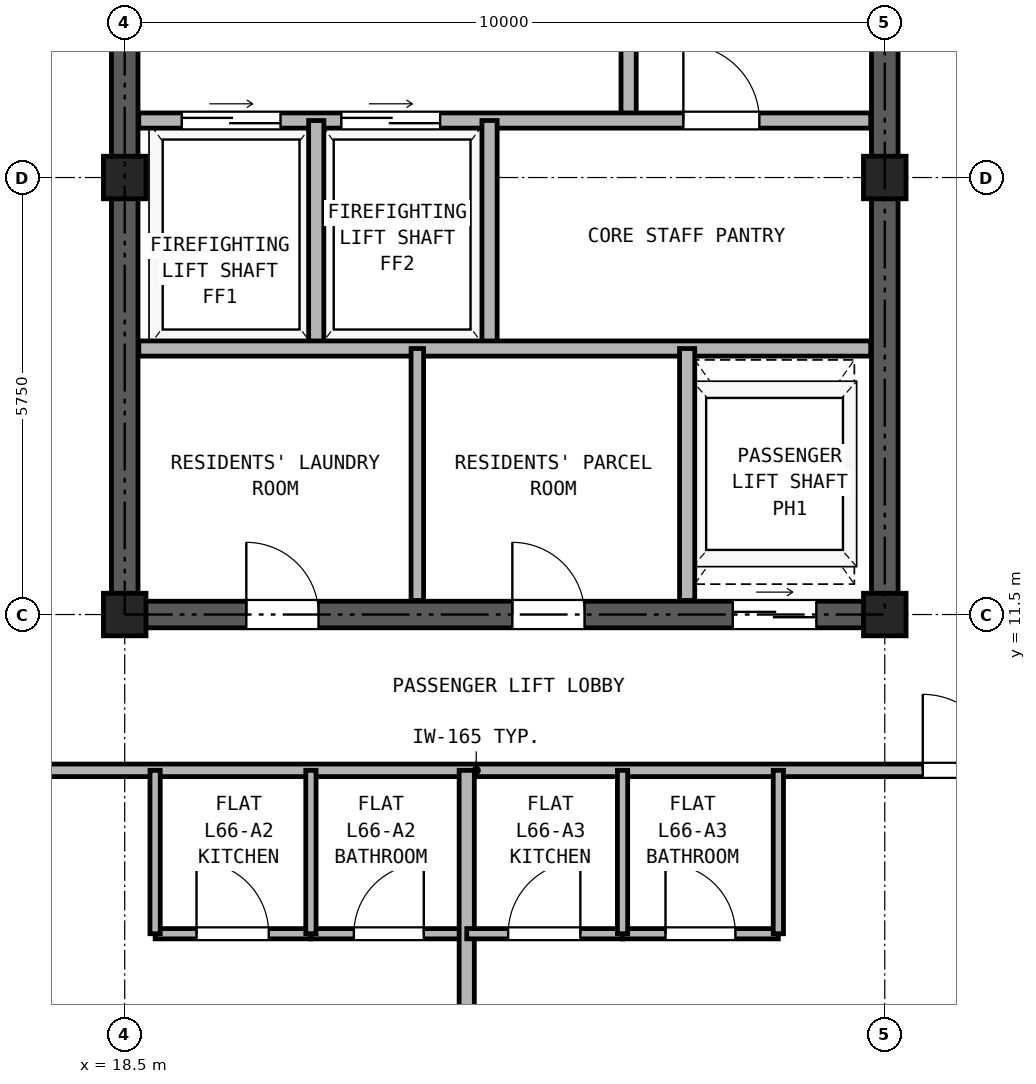
"""IFC4 building model, lengths in metres.
Left out: names, types, materials, properties, quantities, classifications, styles, units other than length and angle.
Written with IfcOpenShell. Run it as: python <this file> out.ifc"""

import sys

from ifc_helpers import new_model, si_unit, direction, frame, frame_2d, origin, origin_2d, place, context, subcontext, project, spatial, rectangle, hollow_rectangle, extrude, source, transform, mapped, element, fill, save


model = new_model("IFC4")
c1 = context("Model", 3, precision=1e-05, world=origin(), true_north=direction((0.0, 1.0)))
c2 = subcontext(c1, "Body", "Model", "MODEL_VIEW")
j1 = project(units=[si_unit("LENGTHUNIT", "METRE"), si_unit("PLANEANGLEUNIT", "RADIAN")], contexts=[c1])
p1 = place(None, origin())
s1 = spatial("IfcSite", under=j1, at=p1, CompositionType="ELEMENT")
p2 = place(p1, origin())
s2 = spatial("IfcBuilding", under=s1, at=p2, CompositionType="ELEMENT")
p3 = place(p2, frame((0.0, 0.0, 232.9)))
s3 = spatial("IfcBuildingStorey", under=s2, at=p3, CompositionType="ELEMENT", Elevation=232.9)
m1 = source(origin(), c2, "Body", "SweptSolid", [
    extrude(hollow_rectangle(XDim=0.56, YDim=0.56, WallThickness=0.03, at=origin_2d()), origin(), (0.0, 0.0, 1.0), 2.98),
])
for number, where, z_axis, x_axis in (
    (1, (18.5, 11.5, 0.0), (0.0, 0.0, 1.0), (1.0, 0.0, 0.0)),
    (2, (18.5, 17.25, 0.0), (0.0, 0.0, 1.0), (1.0, 0.0, 0.0)),
    (3, (28.5, 11.5, 0.0), (0.0, 0.0, 1.0), (1.0, 0.0, 0.0)),
    (4, (28.5, 17.25, 0.0), (0.0, 0.0, 1.0), (1.0, 0.0, 0.0)),
):
    element("IfcColumn", number, at=place(p3, frame(where, z_axis=z_axis, x_axis=x_axis)), inside=s3, PredefinedType="COLUMN", context=c2, shape_type="MappedRepresentation", body=[
        mapped(m1, transform((0.0, 0.0, 0.0), x_axis=(1.0, 0.0, 0.0), y_axis=(0.0, 1.0, 0.0), z_axis=(0.0, 0.0, 1.0), scale=1.0)),
    ])
p4 = place(p3, frame((18.325, 11.5, 0.0), z_axis=(0.0, 0.0, 1.0), x_axis=(1.0, 0.0, 0.0)))
e5 = element("IfcWall", 5, at=p4, inside=s3, PredefinedType="SHEAR", context=c2, shape_type="SweptSolid", body=[
    extrude(rectangle(XDim=10.35, YDim=0.35, at=frame_2d((5.175, 0.0))), origin(), (0.0, 0.0, 1.0), 2.98),
])
p5 = place(p4, frame((1.775, 0.0, 0.0)))
e6 = element("IfcOpeningElement", 6, at=p5, cuts=e5, PredefinedType="OPENING", context=c2, shape_type="SweptSolid", body=[
    extrude(rectangle(XDim=0.95, YDim=2.15, at=frame_2d((0.475, 1.075))), frame((0.0, 0.185, 0.0), z_axis=(0.0, -1.0, 0.0), x_axis=(1.0, 0.0, 0.0)), (0.0, 0.0, 1.0), 0.37),
])
p6 = place(p4, frame((5.275, 0.0, 0.0)))
e7 = element("IfcOpeningElement", 7, at=p6, cuts=e5, PredefinedType="OPENING", context=c2, shape_type="SweptSolid", body=[
    extrude(rectangle(XDim=0.95, YDim=2.15, at=frame_2d((0.475, 1.075))), frame((0.0, 0.185, 0.0), z_axis=(0.0, -1.0, 0.0), x_axis=(1.0, 0.0, 0.0)), (0.0, 0.0, 1.0), 0.37),
])
p7 = place(p4, frame((8.175, 0.0, 0.0)))
e8 = element("IfcOpeningElement", 8, at=p7, cuts=e5, PredefinedType="OPENING", context=c2, shape_type="SweptSolid", body=[
    extrude(rectangle(XDim=1.1, YDim=2.25, at=frame_2d((0.55, 1.125))), frame((0.0, 0.185, 0.0), z_axis=(0.0, -1.0, 0.0), x_axis=(1.0, 0.0, 0.0)), (0.0, 0.0, 1.0), 0.37),
])
p8 = place(p3, frame((18.5, 11.675, 0.0), z_axis=(0.0, 0.0, 1.0), x_axis=(0.0, 1.0, 0.0)))
e9 = element("IfcWall", 9, at=p8, inside=s3, PredefinedType="SHEAR", context=c2, shape_type="SweptSolid", body=[
    extrude(rectangle(XDim=16.9, YDim=0.35, at=frame_2d((8.45, 0.0))), origin(), (0.0, 0.0, 1.0), 2.98),
])
p9 = place(p8, frame((7.475, 0.0, 0.0)))
e10 = element("IfcOpeningElement", 10, at=p9, cuts=e9, PredefinedType="OPENING", context=c2, shape_type="SweptSolid", body=[
    extrude(rectangle(XDim=1.15, YDim=2.2, at=frame_2d((0.575, 1.1))), frame((0.0, 0.185, 0.0), z_axis=(0.0, -1.0, 0.0), x_axis=(1.0, 0.0, 0.0)), (0.0, 0.0, 1.0), 0.37),
])
p10 = place(p3, frame((28.5, 11.675, 0.0), z_axis=(0.0, 0.0, 1.0), x_axis=(0.0, 1.0, 0.0)))
e11 = element("IfcWall", 11, at=p10, inside=s3, PredefinedType="SHEAR", context=c2, shape_type="SweptSolid", body=[
    extrude(rectangle(XDim=16.9, YDim=0.35, at=frame_2d((8.45, 0.0))), origin(), (0.0, 0.0, 1.0), 2.98),
])
p11 = place(p10, frame((7.475, 0.0, 0.0)))
e12 = element("IfcOpeningElement", 12, at=p11, cuts=e11, PredefinedType="OPENING", context=c2, shape_type="SweptSolid", body=[
    extrude(rectangle(XDim=1.15, YDim=2.2, at=frame_2d((0.575, 1.1))), frame((0.0, 0.185, 0.0), z_axis=(0.0, -1.0, 0.0), x_axis=(1.0, 0.0, 0.0)), (0.0, 0.0, 1.0), 0.37),
])
p12 = place(p3, frame((25.13, 18.0, 0.0), z_axis=(0.0, 0.0, 1.0), x_axis=(0.0, 1.0, 0.0)))
e13 = element("IfcWall", 13, at=p12, inside=s3, PredefinedType="PARTITIONING", context=c2, shape_type="SweptSolid", body=[
    extrude(rectangle(XDim=3.39, YDim=0.2, at=frame_2d((1.695, 0.0))), origin(), (0.0, 0.0, 1.0), 2.98),
])
p13 = place(p12, frame((1.1, 0.0, 0.0)))
e14 = element("IfcOpeningElement", 14, at=p13, cuts=e13, PredefinedType="OPENING", context=c2, shape_type="SweptSolid", body=[
    extrude(rectangle(XDim=1.15, YDim=2.2, at=frame_2d((0.575, 1.1))), frame((0.0, 0.11, 0.0), z_axis=(0.0, -1.0, 0.0), x_axis=(1.0, 0.0, 0.0)), (0.0, 0.0, 1.0), 0.22),
])
p14 = place(p3, frame((18.685, 18.0, 0.0), z_axis=(0.0, 0.0, 1.0), x_axis=(1.0, 0.0, 0.0)))
e15 = element("IfcWall", 15, at=p14, inside=s3, PredefinedType="PARTITIONING", context=c2, shape_type="SweptSolid", body=[
    extrude(rectangle(XDim=9.63, YDim=0.2, at=frame_2d((4.815, 0.0))), origin(), (0.0, 0.0, 1.0), 2.98),
])
p15 = place(p14, frame((0.565, 0.0, 0.0)))
e16 = element("IfcOpeningElement", 16, at=p15, cuts=e15, PredefinedType="OPENING", context=c2, shape_type="SweptSolid", body=[
    extrude(rectangle(XDim=1.3, YDim=2.3, at=frame_2d((0.65, 1.15))), frame((0.0, 0.11, 0.0), z_axis=(0.0, -1.0, 0.0), x_axis=(1.0, 0.0, 0.0)), (0.0, 0.0, 1.0), 0.22),
])
p16 = place(p14, frame((2.665, 0.0, 0.0)))
e17 = element("IfcOpeningElement", 17, at=p16, cuts=e15, PredefinedType="OPENING", context=c2, shape_type="SweptSolid", body=[
    extrude(rectangle(XDim=1.3, YDim=2.3, at=frame_2d((0.65, 1.15))), frame((0.0, 0.11, 0.0), z_axis=(0.0, -1.0, 0.0), x_axis=(1.0, 0.0, 0.0)), (0.0, 0.0, 1.0), 0.22),
])
p17 = place(p14, frame((7.165, 0.0, 0.0)))
e18 = element("IfcOpeningElement", 18, at=p17, cuts=e15, PredefinedType="OPENING", context=c2, shape_type="SweptSolid", body=[
    extrude(rectangle(XDim=1.0, YDim=2.15, at=frame_2d((0.5, 1.075))), frame((0.0, 0.11, 0.0), z_axis=(0.0, -1.0, 0.0), x_axis=(1.0, 0.0, 0.0)), (0.0, 0.0, 1.0), 0.22),
])
for number, where, z_axis, x_axis in (
    (19, (21.02, 15.0, 0.0), (0.0, 0.0, 1.0), (0.0, 1.0, 0.0)),
    (20, (23.3, 15.0, 0.0), (0.0, 0.0, 1.0), (0.0, 1.0, 0.0)),
):
    element("IfcWall", number, at=place(p3, frame(where, z_axis=z_axis, x_axis=x_axis)), inside=s3, PredefinedType="PARTITIONING", context=c2, shape_type="SweptSolid", body=[
        extrude(rectangle(XDim=3.0, YDim=0.2, at=frame_2d((1.5, 0.0))), origin(), (0.0, 0.0, 1.0), 2.98),
    ])
p18 = place(p3, frame((18.685, 15.0, 0.0), z_axis=(0.0, 0.0, 1.0), x_axis=(1.0, 0.0, 0.0)))
e21 = element("IfcWall", 21, at=p18, inside=s3, PredefinedType="PARTITIONING", context=c2, shape_type="SweptSolid", body=[
    extrude(rectangle(XDim=9.63, YDim=0.2, at=frame_2d((4.815, 0.0))), origin(), (0.0, 0.0, 1.0), 2.98),
])
p19 = place(p3, frame((22.35, 11.685, 0.0), z_axis=(0.0, 0.0, 1.0), x_axis=(0.0, 1.0, 0.0)))
e22 = element("IfcWall", 22, at=p19, inside=s3, PredefinedType="PARTITIONING", context=c2, shape_type="SweptSolid", body=[
    extrude(rectangle(XDim=3.315, YDim=0.165, at=frame_2d((1.657, 0.0))), origin(), (0.0, 0.0, 1.0), 2.98),
])
p20 = place(p3, frame((25.9, 11.685, 0.0), z_axis=(0.0, 0.0, 1.0), x_axis=(0.0, 1.0, 0.0)))
e23 = element("IfcWall", 23, at=p20, inside=s3, PredefinedType="PARTITIONING", context=c2, shape_type="SweptSolid", body=[
    extrude(rectangle(XDim=3.315, YDim=0.2, at=frame_2d((1.657, 0.0))), origin(), (0.0, 0.0, 1.0), 2.98),
])
p21 = place(p3, frame((5.36, 9.45, 0.0), z_axis=(0.0, 0.0, 1.0), x_axis=(1.0, 0.0, 0.0)))
e24 = element("IfcWall", 24, at=p21, inside=s3, PredefinedType="PARTITIONING", context=c2, shape_type="SweptSolid", body=[
    extrude(rectangle(XDim=36.28, YDim=0.165, at=frame_2d((18.14, 0.0))), origin(), (0.0, 0.0, 1.0), 2.98),
])
p22 = place(p21, frame((7.115, 0.0, 0.0)))
e25 = element("IfcOpeningElement", 25, at=p22, cuts=e24, PredefinedType="OPENING", context=c2, shape_type="SweptSolid", body=[
    extrude(rectangle(XDim=1.0, YDim=2.15, at=frame_2d((0.5, 1.075))), frame((0.0, 0.093, 0.0), z_axis=(0.0, -1.0, 0.0), x_axis=(1.0, 0.0, 0.0)), (0.0, 0.0, 1.0), 0.185),
])
p23 = place(p21, frame((10.89, 0.0, 0.0)))
e26 = element("IfcOpeningElement", 26, at=p23, cuts=e24, PredefinedType="OPENING", context=c2, shape_type="SweptSolid", body=[
    extrude(rectangle(XDim=1.0, YDim=2.15, at=frame_2d((0.5, 1.075))), frame((0.0, 0.093, 0.0), z_axis=(0.0, -1.0, 0.0), x_axis=(1.0, 0.0, 0.0)), (0.0, 0.0, 1.0), 0.185),
])
p24 = place(p21, frame((23.64, 0.0, 0.0)))
e27 = element("IfcOpeningElement", 27, at=p24, cuts=e24, PredefinedType="OPENING", context=c2, shape_type="SweptSolid", body=[
    extrude(rectangle(XDim=1.0, YDim=2.15, at=frame_2d((0.5, 1.075))), frame((0.0, 0.093, 0.0), z_axis=(0.0, -1.0, 0.0), x_axis=(1.0, 0.0, 0.0)), (0.0, 0.0, 1.0), 0.185),
])
p25 = place(p21, frame((27.915, 0.0, 0.0)))
e28 = element("IfcOpeningElement", 28, at=p25, cuts=e24, PredefinedType="OPENING", context=c2, shape_type="SweptSolid", body=[
    extrude(rectangle(XDim=1.0, YDim=2.15, at=frame_2d((0.5, 1.075))), frame((0.0, 0.093, 0.0), z_axis=(0.0, -1.0, 0.0), x_axis=(1.0, 0.0, 0.0)), (0.0, 0.0, 1.0), 0.185),
])
p26 = place(p3, frame((18.9, 7.3, 0.0), z_axis=(0.0, 0.0, 1.0), x_axis=(1.0, 0.0, 0.0)))
e29 = element("IfcWall", 29, at=p26, inside=s3, PredefinedType="PARTITIONING", context=c2, shape_type="SweptSolid", body=[
    extrude(rectangle(XDim=2.05, YDim=0.135, at=frame_2d((1.025, 0.0))), origin(), (0.0, 0.0, 1.0), 2.98),
])
p27 = place(p26, frame((0.545, 0.0, 0.0)))
e30 = element("IfcOpeningElement", 30, at=p27, cuts=e29, PredefinedType="OPENING", context=c2, shape_type="SweptSolid", body=[
    extrude(rectangle(XDim=0.95, YDim=2.15, at=frame_2d((0.475, 1.075))), frame((0.0, 0.077, 0.0), z_axis=(0.0, -1.0, 0.0), x_axis=(1.0, 0.0, 0.0)), (0.0, 0.0, 1.0), 0.155),
])
p28 = place(p3, frame((20.95, 7.3, 0.0), z_axis=(0.0, 0.0, 1.0), x_axis=(1.0, 0.0, 0.0)))
e31 = element("IfcWall", 31, at=p28, inside=s3, PredefinedType="PARTITIONING", context=c2, shape_type="SweptSolid", body=[
    extrude(rectangle(XDim=2.05, YDim=0.135, at=frame_2d((1.025, 0.0))), origin(), (0.0, 0.0, 1.0), 2.98),
])
p29 = place(p28, frame((0.565, 0.0, 0.0)))
e32 = element("IfcOpeningElement", 32, at=p29, cuts=e31, PredefinedType="OPENING", context=c2, shape_type="SweptSolid", body=[
    extrude(rectangle(XDim=0.92, YDim=2.1, at=frame_2d((0.46, 1.05))), frame((0.0, 0.077, 0.0), z_axis=(0.0, -1.0, 0.0), x_axis=(1.0, 0.0, 0.0)), (0.0, 0.0, 1.0), 0.155),
])
for number, where, z_axis, x_axis in (
    (33, (18.9, 7.3, 0.0), (0.0, 0.0, 1.0), (0.0, 1.0, 0.0)),
    (34, (20.95, 7.3, 0.0), (0.0, 0.0, 1.0), (0.0, 1.0, 0.0)),
):
    element("IfcWall", number, at=place(p3, frame(where, z_axis=z_axis, x_axis=x_axis)), inside=s3, PredefinedType="PARTITIONING", context=c2, shape_type="SweptSolid", body=[
        extrude(rectangle(XDim=2.15, YDim=0.135, at=frame_2d((1.075, 0.0))), origin(), (0.0, 0.0, 1.0), 2.98),
    ])
p30 = place(p3, frame((23.0, 0.16, 0.0), z_axis=(0.0, 0.0, 1.0), x_axis=(0.0, 1.0, 0.0)))
e35 = element("IfcWall", 35, at=p30, inside=s3, PredefinedType="PARTITIONING", context=c2, shape_type="SweptSolid", body=[
    extrude(rectangle(XDim=9.29, YDim=0.2, at=frame_2d((4.645, 0.0))), origin(), (0.0, 0.0, 1.0), 2.98),
])
p31 = place(p3, frame((23.0, 7.3, 0.0), z_axis=(0.0, 0.0, 1.0), x_axis=(1.0, 0.0, 0.0)))
e36 = element("IfcWall", 36, at=p31, inside=s3, PredefinedType="PARTITIONING", context=c2, shape_type="SweptSolid", body=[
    extrude(rectangle(XDim=2.05, YDim=0.135, at=frame_2d((1.025, 0.0))), origin(), (0.0, 0.0, 1.0), 2.98),
])
p32 = place(p31, frame((0.545, 0.0, 0.0)))
e37 = element("IfcOpeningElement", 37, at=p32, cuts=e36, PredefinedType="OPENING", context=c2, shape_type="SweptSolid", body=[
    extrude(rectangle(XDim=0.95, YDim=2.15, at=frame_2d((0.475, 1.075))), frame((0.0, 0.077, 0.0), z_axis=(0.0, -1.0, 0.0), x_axis=(1.0, 0.0, 0.0)), (0.0, 0.0, 1.0), 0.155),
])
p33 = place(p3, frame((25.05, 7.3, 0.0), z_axis=(0.0, 0.0, 1.0), x_axis=(1.0, 0.0, 0.0)))
e38 = element("IfcWall", 38, at=p33, inside=s3, PredefinedType="PARTITIONING", context=c2, shape_type="SweptSolid", body=[
    extrude(rectangle(XDim=2.05, YDim=0.135, at=frame_2d((1.025, 0.0))), origin(), (0.0, 0.0, 1.0), 2.98),
])
p34 = place(p33, frame((0.565, 0.0, 0.0)))
e39 = element("IfcOpeningElement", 39, at=p34, cuts=e38, PredefinedType="OPENING", context=c2, shape_type="SweptSolid", body=[
    extrude(rectangle(XDim=0.92, YDim=2.1, at=frame_2d((0.46, 1.05))), frame((0.0, 0.077, 0.0), z_axis=(0.0, -1.0, 0.0), x_axis=(1.0, 0.0, 0.0)), (0.0, 0.0, 1.0), 0.155),
])
for number, where, z_axis, x_axis in (
    (40, (25.05, 7.3, 0.0), (0.0, 0.0, 1.0), (0.0, 1.0, 0.0)),
    (41, (27.1, 7.3, 0.0), (0.0, 0.0, 1.0), (0.0, 1.0, 0.0)),
):
    element("IfcWall", number, at=place(p3, frame(where, z_axis=z_axis, x_axis=x_axis)), inside=s3, PredefinedType="PARTITIONING", context=c2, shape_type="SweptSolid", body=[
        extrude(rectangle(XDim=2.15, YDim=0.135, at=frame_2d((1.075, 0.0))), origin(), (0.0, 0.0, 1.0), 2.98),
    ])
p35 = place(p15, origin())
e42 = element("IfcDoor", 42, at=p35, inside=s3, OperationType="DOUBLE_DOOR_SLIDING", PredefinedType="DOOR", context=c2, shape_type="SweptSolid", body=[
    extrude(rectangle(XDim=1.3, YDim=2.3, at=frame_2d((0.65, 1.15))), frame((0.0, 0.025, 0.0), z_axis=(0.0, -1.0, 0.0), x_axis=(1.0, 0.0, 0.0)), (0.0, 0.0, 1.0), 0.05),
])
fill(e16, e42)
p36 = place(p16, origin())
e43 = element("IfcDoor", 43, at=p36, inside=s3, OperationType="DOUBLE_DOOR_SLIDING", PredefinedType="DOOR", context=c2, shape_type="SweptSolid", body=[
    extrude(rectangle(XDim=1.3, YDim=2.3, at=frame_2d((0.65, 1.15))), frame((0.0, 0.025, 0.0), z_axis=(0.0, -1.0, 0.0), x_axis=(1.0, 0.0, 0.0)), (0.0, 0.0, 1.0), 0.05),
])
fill(e17, e43)
p37 = place(p17, frame((1.0, 0.0, 0.0), z_axis=(0.0, 0.0, 1.0), x_axis=(-1.0, 0.0, 0.0)))
e44 = element("IfcDoor", 44, at=p37, inside=s3, OperationType="SINGLE_SWING_LEFT", PredefinedType="DOOR", context=c2, shape_type="SweptSolid", body=[
    extrude(rectangle(XDim=1.0, YDim=2.15, at=frame_2d((0.5, 1.075))), frame((0.0, 0.025, 0.0), z_axis=(0.0, -1.0, 0.0), x_axis=(1.0, 0.0, 0.0)), (0.0, 0.0, 1.0), 0.05),
])
fill(e18, e44)
p38 = place(p5, frame((0.95, 0.0, 0.0), z_axis=(0.0, 0.0, 1.0), x_axis=(-1.0, 0.0, 0.0)))
e45 = element("IfcDoor", 45, at=p38, inside=s3, OperationType="SINGLE_SWING_LEFT", PredefinedType="DOOR", context=c2, shape_type="SweptSolid", body=[
    extrude(rectangle(XDim=0.95, YDim=2.15, at=frame_2d((0.475, 1.075))), frame((0.0, 0.025, 0.0), z_axis=(0.0, -1.0, 0.0), x_axis=(1.0, 0.0, 0.0)), (0.0, 0.0, 1.0), 0.05),
])
fill(e6, e45)
p39 = place(p6, frame((0.95, 0.0, 0.0), z_axis=(0.0, 0.0, 1.0), x_axis=(-1.0, 0.0, 0.0)))
e46 = element("IfcDoor", 46, at=p39, inside=s3, OperationType="SINGLE_SWING_LEFT", PredefinedType="DOOR", context=c2, shape_type="SweptSolid", body=[
    extrude(rectangle(XDim=0.95, YDim=2.15, at=frame_2d((0.475, 1.075))), frame((0.0, 0.025, 0.0), z_axis=(0.0, -1.0, 0.0), x_axis=(1.0, 0.0, 0.0)), (0.0, 0.0, 1.0), 0.05),
])
fill(e7, e46)
p40 = place(p7, frame((1.1, 0.0, 0.0), z_axis=(0.0, 0.0, 1.0), x_axis=(-1.0, 0.0, 0.0)))
e47 = element("IfcDoor", 47, at=p40, inside=s3, OperationType="DOUBLE_DOOR_SLIDING", PredefinedType="DOOR", context=c2, shape_type="SweptSolid", body=[
    extrude(rectangle(XDim=1.1, YDim=2.25, at=frame_2d((0.55, 1.125))), frame((0.0, 0.025, 0.0), z_axis=(0.0, -1.0, 0.0), x_axis=(1.0, 0.0, 0.0)), (0.0, 0.0, 1.0), 0.05),
])
fill(e8, e47)
p41 = place(p27, origin())
e48 = element("IfcDoor", 48, at=p41, inside=s3, OperationType="SINGLE_SWING_LEFT", PredefinedType="DOOR", context=c2, shape_type="SweptSolid", body=[
    extrude(rectangle(XDim=0.95, YDim=2.15, at=frame_2d((0.475, 1.075))), frame((0.0, 0.025, 0.0), z_axis=(0.0, -1.0, 0.0), x_axis=(1.0, 0.0, 0.0)), (0.0, 0.0, 1.0), 0.05),
])
fill(e30, e48)
p42 = place(p29, origin())
e49 = element("IfcDoor", 49, at=p42, inside=s3, OperationType="SINGLE_SWING_RIGHT", PredefinedType="DOOR", context=c2, shape_type="SweptSolid", body=[
    extrude(rectangle(XDim=0.92, YDim=2.1, at=frame_2d((0.46, 1.05))), frame((0.0, 0.025, 0.0), z_axis=(0.0, -1.0, 0.0), x_axis=(1.0, 0.0, 0.0)), (0.0, 0.0, 1.0), 0.05),
])
fill(e32, e49)
p43 = place(p32, origin())
e50 = element("IfcDoor", 50, at=p43, inside=s3, OperationType="SINGLE_SWING_RIGHT", PredefinedType="DOOR", context=c2, shape_type="SweptSolid", body=[
    extrude(rectangle(XDim=0.95, YDim=2.15, at=frame_2d((0.475, 1.075))), frame((0.0, 0.025, 0.0), z_axis=(0.0, -1.0, 0.0), x_axis=(1.0, 0.0, 0.0)), (0.0, 0.0, 1.0), 0.05),
])
fill(e37, e50)
p44 = place(p34, origin())
e51 = element("IfcDoor", 51, at=p44, inside=s3, OperationType="SINGLE_SWING_LEFT", PredefinedType="DOOR", context=c2, shape_type="SweptSolid", body=[
    extrude(rectangle(XDim=0.92, YDim=2.1, at=frame_2d((0.46, 1.05))), frame((0.0, 0.025, 0.0), z_axis=(0.0, -1.0, 0.0), x_axis=(1.0, 0.0, 0.0)), (0.0, 0.0, 1.0), 0.05),
])
fill(e39, e51)
p45 = place(p24, frame((1.0, 0.0, 0.0), z_axis=(0.0, 0.0, 1.0), x_axis=(-1.0, 0.0, 0.0)))
e52 = element("IfcDoor", 52, at=p45, inside=s3, OperationType="SINGLE_SWING_LEFT", PredefinedType="DOOR", context=c2, shape_type="SweptSolid", body=[
    extrude(rectangle(XDim=1.0, YDim=2.15, at=frame_2d((0.5, 1.075))), frame((0.0, 0.025, 0.0), z_axis=(0.0, -1.0, 0.0), x_axis=(1.0, 0.0, 0.0)), (0.0, 0.0, 1.0), 0.05),
])
fill(e27, e52)
save(model, sys.argv[1])
